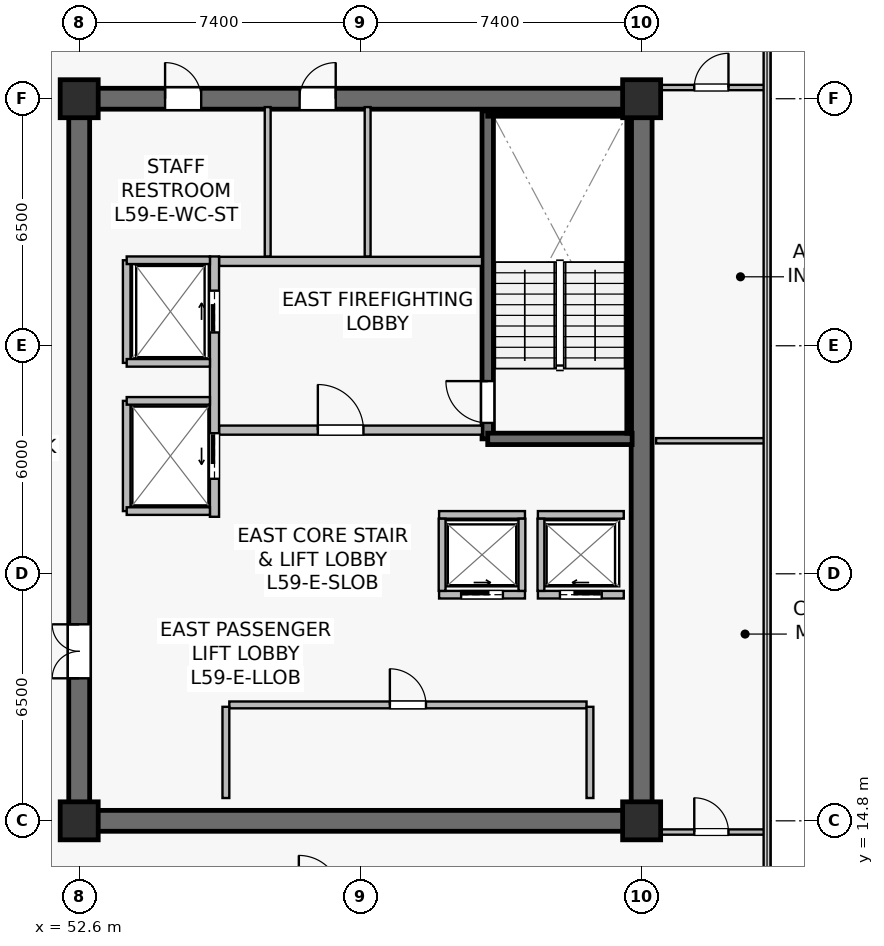
"""IFC4 building model, lengths in metres.
Left out: names, types, materials, properties, quantities, classifications, styles, units other than length and angle.
Written with IfcOpenShell. Run it as: python <this file> out.ifc"""

import sys

from ifc_helpers import new_model, si_unit, direction, frame, frame_2d, origin, origin_2d, place, context, subcontext, project, spatial, rectangle, extrude, source, transform, mapped, element, fill, save


model = new_model("IFC4")
c1 = context("Model", 3, precision=1e-05, world=origin(), true_north=direction((0.0, 1.0)))
c2 = subcontext(c1, "Body", "Model", "MODEL_VIEW")
j1 = project(units=[si_unit("LENGTHUNIT", "METRE"), si_unit("PLANEANGLEUNIT", "RADIAN")], contexts=[c1])
p1 = place(None, origin())
s1 = spatial("IfcSite", under=j1, at=p1, CompositionType="ELEMENT")
p2 = place(p1, origin())
s2 = spatial("IfcBuilding", under=s1, at=p2, CompositionType="ELEMENT")
p3 = place(p2, frame((0.0, 0.0, 246.5)))
s3 = spatial("IfcBuildingStorey", under=s2, at=p3, CompositionType="ELEMENT", Elevation=246.5)
p4 = place(p3, frame((52.325, 14.8, 0.0), z_axis=(0.0, 0.0, 1.0), x_axis=(1.0, 0.0, 0.0)))
e1 = element("IfcWall", 1, at=p4, inside=s3, PredefinedType="SHEAR", context=c2, shape_type="SweptSolid", body=[
    extrude(rectangle(XDim=15.35, YDim=0.55, at=frame_2d((7.675, 0.0))), origin(), (0.0, 0.0, 1.0), 3.8),
])
p5 = place(p3, frame((52.325, 33.8, 0.0), z_axis=(0.0, 0.0, 1.0), x_axis=(1.0, 0.0, 0.0)))
e2 = element("IfcWall", 2, at=p5, inside=s3, PredefinedType="SHEAR", context=c2, shape_type="SweptSolid", body=[
    extrude(rectangle(XDim=15.35, YDim=0.55, at=frame_2d((7.675, 0.0))), origin(), (0.0, 0.0, 1.0), 3.8),
])
p6 = place(p5, frame((6.075, 0.0, 0.0)))
e3 = element("IfcOpeningElement", 3, at=p6, cuts=e2, PredefinedType="OPENING", context=c2, shape_type="SweptSolid", body=[
    extrude(rectangle(XDim=0.95, YDim=2.15, at=frame_2d((0.475, 1.075))), frame((0.0, 0.285, 0.0), z_axis=(0.0, -1.0, 0.0), x_axis=(1.0, 0.0, 0.0)), (0.0, 0.0, 1.0), 0.57),
])
p7 = place(p5, frame((2.535, 0.0, 0.0)))
e4 = element("IfcOpeningElement", 4, at=p7, cuts=e2, PredefinedType="OPENING", context=c2, shape_type="SweptSolid", body=[
    extrude(rectangle(XDim=0.95, YDim=2.15, at=frame_2d((0.475, 1.075))), frame((0.0, 0.285, 0.0), z_axis=(0.0, -1.0, 0.0), x_axis=(1.0, 0.0, 0.0)), (0.0, 0.0, 1.0), 0.57),
])
p8 = place(p3, frame((52.6, 15.075, 0.0), z_axis=(0.0, 0.0, 1.0), x_axis=(0.0, 1.0, 0.0)))
e5 = element("IfcWall", 5, at=p8, inside=s3, PredefinedType="SHEAR", context=c2, shape_type="SweptSolid", body=[
    extrude(rectangle(XDim=18.45, YDim=0.55, at=frame_2d((9.225, 0.0))), origin(), (0.0, 0.0, 1.0), 3.8),
])
p9 = place(p8, frame((3.475, 0.0, 0.0)))
e6 = element("IfcOpeningElement", 6, at=p9, cuts=e5, PredefinedType="OPENING", context=c2, shape_type="SweptSolid", body=[
    extrude(rectangle(XDim=1.42, YDim=2.2, at=frame_2d((0.71, 1.1))), frame((0.0, 0.285, 0.0), z_axis=(0.0, -1.0, 0.0), x_axis=(1.0, 0.0, 0.0)), (0.0, 0.0, 1.0), 0.57),
])
p10 = place(p3, frame((67.4, 15.075, 0.0), z_axis=(0.0, 0.0, 1.0), x_axis=(0.0, 1.0, 0.0)))
e7 = element("IfcWall", 7, at=p10, inside=s3, PredefinedType="SHEAR", context=c2, shape_type="SweptSolid", body=[
    extrude(rectangle(XDim=18.45, YDim=0.55, at=frame_2d((9.225, 0.0))), origin(), (0.0, 0.0, 1.0), 3.8),
])
p11 = place(p3, frame((63.35, 24.85, 0.0), z_axis=(0.0, 0.0, 1.0), x_axis=(0.0, 1.0, 0.0)))
e8 = element("IfcWall", 8, at=p11, inside=s3, PredefinedType="SHEAR", context=c2, shape_type="SweptSolid", body=[
    extrude(rectangle(XDim=8.63, YDim=0.3, at=frame_2d((4.315, 0.0))), origin(), (0.0, 0.0, 1.0), 3.8),
])
p12 = place(p11, frame((0.42, 0.0, 0.0)))
e9 = element("IfcOpeningElement", 9, at=p12, cuts=e8, PredefinedType="OPENING", context=c2, shape_type="SweptSolid", body=[
    extrude(rectangle(XDim=1.1, YDim=2.15, at=frame_2d((0.55, 1.075))), frame((0.0, 0.16, 0.0), z_axis=(0.0, -1.0, 0.0), x_axis=(1.0, 0.0, 0.0)), (0.0, 0.0, 1.0), 0.32),
])
p13 = place(p3, frame((63.35, 24.85, 0.0), z_axis=(0.0, 0.0, 1.0), x_axis=(1.0, 0.0, 0.0)))
e10 = element("IfcWall", 10, at=p13, inside=s3, PredefinedType="SHEAR", context=c2, shape_type="SweptSolid", body=[
    extrude(rectangle(XDim=3.8, YDim=0.3, at=frame_2d((1.9, 0.0))), origin(), (0.0, 0.0, 1.0), 3.8),
])
p14 = place(p3, frame((63.35, 33.4, 0.0), z_axis=(0.0, 0.0, 1.0), x_axis=(1.0, 0.0, 0.0)))
e11 = element("IfcWall", 11, at=p14, inside=s3, PredefinedType="SOLIDWALL", context=c2, shape_type="SweptSolid", body=[
    extrude(rectangle(XDim=3.72, YDim=0.12, at=frame_2d((1.86, 0.0))), origin(), (0.0, 0.0, 1.0), 3.8),
])
p15 = place(p3, frame((67.07, 25.0, 0.0), z_axis=(0.0, 0.0, 1.0), x_axis=(0.0, 1.0, 0.0)))
e12 = element("IfcWall", 12, at=p15, inside=s3, PredefinedType="SOLIDWALL", context=c2, shape_type="SweptSolid", body=[
    extrude(rectangle(XDim=8.32, YDim=0.12, at=frame_2d((4.16, 0.0))), origin(), (0.0, 0.0, 1.0), 3.8),
])
m1 = source(origin(), c2, "Body", "SweptSolid", [
    extrude(rectangle(XDim=1.0, YDim=1.0, at=origin_2d()), origin(), (0.0, 0.0, 1.0), 4.1),
])
for number, where, z_axis, x_axis in (
    (13, (52.6, 14.8, 0.0), (0.0, 0.0, 1.0), (1.0, 0.0, 0.0)),
    (14, (67.4, 14.8, 0.0), (0.0, 0.0, 1.0), (1.0, 0.0, 0.0)),
    (15, (52.6, 33.8, 0.0), (0.0, 0.0, 1.0), (1.0, 0.0, 0.0)),
    (16, (67.4, 33.8, 0.0), (0.0, 0.0, 1.0), (1.0, 0.0, 0.0)),
):
    element("IfcColumn", number, at=place(p3, frame(where, z_axis=z_axis, x_axis=x_axis)), inside=s3, PredefinedType="COLUMN", context=c2, shape_type="MappedRepresentation", body=[
        mapped(m1, transform((0.0, 0.0, 0.0), scale=1.0)),
    ])
p16 = place(p3, frame((56.28, 25.08, 0.0), z_axis=(0.0, 0.0, 1.0), x_axis=(1.0, 0.0, 0.0)))
e17 = element("IfcWall", 17, at=p16, inside=s3, PredefinedType="SOLIDWALL", context=c2, shape_type="SweptSolid", body=[
    extrude(rectangle(XDim=6.92, YDim=0.24, at=frame_2d((3.46, 0.0))), origin(), (0.0, 0.0, 1.0), 3.197),
])
p17 = place(p16, frame((2.6, 0.0, 0.0)))
e18 = element("IfcOpeningElement", 18, at=p17, cuts=e17, PredefinedType="OPENING", context=c2, shape_type="SweptSolid", body=[
    extrude(rectangle(XDim=1.2, YDim=2.16, at=frame_2d((0.6, 1.08))), frame((0.0, 0.13, 0.0), z_axis=(0.0, -1.0, 0.0), x_axis=(1.0, 0.0, 0.0)), (0.0, 0.0, 1.0), 0.26),
])
p18 = place(p3, frame((56.28, 29.52, 0.0), z_axis=(0.0, 0.0, 1.0), x_axis=(1.0, 0.0, 0.0)))
e19 = element("IfcWall", 19, at=p18, inside=s3, PredefinedType="SOLIDWALL", context=c2, shape_type="SweptSolid", body=[
    extrude(rectangle(XDim=6.92, YDim=0.24, at=frame_2d((3.46, 0.0))), origin(), (0.0, 0.0, 1.0), 3.197),
])
p19 = place(p3, frame((56.16, 22.8, 0.0), z_axis=(0.0, 0.0, 1.0), x_axis=(0.0, 1.0, 0.0)))
e20 = element("IfcWall", 20, at=p19, inside=s3, PredefinedType="SOLIDWALL", context=c2, shape_type="SweptSolid", body=[
    extrude(rectangle(XDim=6.85, YDim=0.24, at=frame_2d((3.425, 0.0))), origin(), (0.0, 0.0, 1.0), 2.935),
])
p20 = place(p19, frame((4.85, 0.0, 0.0)))
e21 = element("IfcOpeningElement", 21, at=p20, cuts=e20, PredefinedType="OPENING", context=c2, shape_type="SweptSolid", body=[
    extrude(rectangle(XDim=1.1, YDim=2.22, at=frame_2d((0.55, 1.11))), frame((0.0, 0.13, 0.0), z_axis=(0.0, -1.0, 0.0), x_axis=(1.0, 0.0, 0.0)), (0.0, 0.0, 1.0), 0.26),
])
p21 = place(p19, frame((1.0, 0.0, 0.0)))
e22 = element("IfcOpeningElement", 22, at=p21, cuts=e20, PredefinedType="OPENING", context=c2, shape_type="SweptSolid", body=[
    extrude(rectangle(XDim=1.2, YDim=2.22, at=frame_2d((0.6, 1.11))), frame((0.0, 0.13, 0.0), z_axis=(0.0, -1.0, 0.0), x_axis=(1.0, 0.0, 0.0)), (0.0, 0.0, 1.0), 0.26),
])
p22 = place(p3, frame((64.67, 20.75, 0.0), z_axis=(0.0, 0.0, 1.0), x_axis=(1.0, 0.0, 0.0)))
e23 = element("IfcWall", 23, at=p22, inside=s3, PredefinedType="SOLIDWALL", context=c2, shape_type="SweptSolid", body=[
    extrude(rectangle(XDim=2.26, YDim=0.2, at=frame_2d((1.13, 0.0))), origin(), (0.0, 0.0, 1.0), 3.8),
])
p23 = place(p22, frame((0.58, 0.0, 0.0)))
e24 = element("IfcOpeningElement", 24, at=p23, cuts=e23, PredefinedType="OPENING", context=c2, shape_type="SweptSolid", body=[
    extrude(rectangle(XDim=1.1, YDim=2.22, at=frame_2d((0.55, 1.11))), frame((0.0, 0.11, 0.0), z_axis=(0.0, -1.0, 0.0), x_axis=(1.0, 0.0, 0.0)), (0.0, 0.0, 1.0), 0.22),
])
p24 = place(p3, frame((64.67, 22.85, 0.0), z_axis=(0.0, 0.0, 1.0), x_axis=(1.0, 0.0, 0.0)))
e25 = element("IfcWall", 25, at=p24, inside=s3, PredefinedType="SOLIDWALL", context=c2, shape_type="SweptSolid", body=[
    extrude(rectangle(XDim=2.26, YDim=0.2, at=frame_2d((1.13, 0.0))), origin(), (0.0, 0.0, 1.0), 3.8),
])
p25 = place(p3, frame((64.75, 20.85, 0.0), z_axis=(0.0, 0.0, 1.0), x_axis=(0.0, 1.0, 0.0)))
e26 = element("IfcWall", 26, at=p25, inside=s3, PredefinedType="SOLIDWALL", context=c2, shape_type="SweptSolid", body=[
    extrude(rectangle(XDim=1.9, YDim=0.18, at=frame_2d((0.95, 0.0))), origin(), (0.0, 0.0, 1.0), 3.8),
])
p26 = place(p3, frame((62.07, 20.75, 0.0), z_axis=(0.0, 0.0, 1.0), x_axis=(1.0, 0.0, 0.0)))
e27 = element("IfcWall", 27, at=p26, inside=s3, PredefinedType="SOLIDWALL", context=c2, shape_type="SweptSolid", body=[
    extrude(rectangle(XDim=2.26, YDim=0.2, at=frame_2d((1.13, 0.0))), origin(), (0.0, 0.0, 1.0), 3.8),
])
p27 = place(p26, frame((0.58, 0.0, 0.0)))
e28 = element("IfcOpeningElement", 28, at=p27, cuts=e27, PredefinedType="OPENING", context=c2, shape_type="SweptSolid", body=[
    extrude(rectangle(XDim=1.1, YDim=2.22, at=frame_2d((0.55, 1.11))), frame((0.0, 0.11, 0.0), z_axis=(0.0, -1.0, 0.0), x_axis=(1.0, 0.0, 0.0)), (0.0, 0.0, 1.0), 0.22),
])
p28 = place(p3, frame((62.07, 22.85, 0.0), z_axis=(0.0, 0.0, 1.0), x_axis=(1.0, 0.0, 0.0)))
e29 = element("IfcWall", 29, at=p28, inside=s3, PredefinedType="SOLIDWALL", context=c2, shape_type="SweptSolid", body=[
    extrude(rectangle(XDim=2.26, YDim=0.2, at=frame_2d((1.13, 0.0))), origin(), (0.0, 0.0, 1.0), 3.8),
])
for number, where, z_axis, x_axis in (
    (30, (62.15, 20.85, 0.0), (0.0, 0.0, 1.0), (0.0, 1.0, 0.0)),
    (31, (64.25, 20.85, 0.0), (0.0, 0.0, 1.0), (0.0, 1.0, 0.0)),
):
    element("IfcWall", number, at=place(p3, frame(where, z_axis=z_axis, x_axis=x_axis)), inside=s3, PredefinedType="SOLIDWALL", context=c2, shape_type="SweptSolid", body=[
        extrude(rectangle(XDim=1.9, YDim=0.18, at=frame_2d((0.95, 0.0))), origin(), (0.0, 0.0, 1.0), 3.8),
    ])
p29 = place(p3, frame((53.85, 26.85, 0.0), z_axis=(0.0, 0.0, 1.0), x_axis=(0.0, 1.0, 0.0)))
e32 = element("IfcWall", 32, at=p29, inside=s3, PredefinedType="SOLIDWALL", context=c2, shape_type="SweptSolid", body=[
    extrude(rectangle(XDim=2.7, YDim=0.2, at=frame_2d((1.35, 0.0))), origin(), (0.0, 0.0, 1.0), 3.8),
])
p30 = place(p3, frame((53.85, 29.55, 0.0), z_axis=(0.0, 0.0, 1.0), x_axis=(1.0, 0.0, 0.0)))
e33 = element("IfcWall", 33, at=p30, inside=s3, PredefinedType="SOLIDWALL", context=c2, shape_type="SweptSolid", body=[
    extrude(rectangle(XDim=2.19, YDim=0.2, at=frame_2d((1.095, 0.0))), origin(), (0.0, 0.0, 1.0), 3.8),
])
p31 = place(p3, frame((53.85, 26.85, 0.0), z_axis=(0.0, 0.0, 1.0), x_axis=(1.0, 0.0, 0.0)))
e34 = element("IfcWall", 34, at=p31, inside=s3, PredefinedType="SOLIDWALL", context=c2, shape_type="SweptSolid", body=[
    extrude(rectangle(XDim=2.19, YDim=0.2, at=frame_2d((1.095, 0.0))), origin(), (0.0, 0.0, 1.0), 3.197),
])
p32 = place(p3, frame((53.85, 22.95, 0.0), z_axis=(0.0, 0.0, 1.0), x_axis=(0.0, 1.0, 0.0)))
e35 = element("IfcWall", 35, at=p32, inside=s3, PredefinedType="SOLIDWALL", context=c2, shape_type="SweptSolid", body=[
    extrude(rectangle(XDim=2.9, YDim=0.2, at=frame_2d((1.45, 0.0))), origin(), (0.0, 0.0, 1.0), 2.935),
])
for number, where, z_axis, x_axis in (
    (36, (53.85, 25.85, 0.0), (0.0, 0.0, 1.0), (1.0, 0.0, 0.0)),
    (37, (53.85, 22.95, 0.0), (0.0, 0.0, 1.0), (1.0, 0.0, 0.0)),
):
    element("IfcWall", number, at=place(p3, frame(where, z_axis=z_axis, x_axis=x_axis)), inside=s3, PredefinedType="SOLIDWALL", context=c2, shape_type="SweptSolid", body=[
        extrude(rectangle(XDim=2.19, YDim=0.2, at=frame_2d((1.095, 0.0))), origin(), (0.0, 0.0, 1.0), 3.8),
    ])
p33 = place(p3, frame((56.55, 17.85, 0.0), z_axis=(0.0, 0.0, 1.0), x_axis=(1.0, 0.0, 0.0)))
e38 = element("IfcWall", 38, at=p33, inside=s3, PredefinedType="SOLIDWALL", context=c2, shape_type="SweptSolid", body=[
    extrude(rectangle(XDim=9.4, YDim=0.18, at=frame_2d((4.7, 0.0))), origin(), (0.0, 0.0, 1.0), 3.197),
])
p34 = place(p33, frame((4.225, 0.0, 0.0)))
e39 = element("IfcOpeningElement", 39, at=p34, cuts=e38, PredefinedType="OPENING", context=c2, shape_type="SweptSolid", body=[
    extrude(rectangle(XDim=0.95, YDim=2.15, at=frame_2d((0.475, 1.075))), frame((0.0, 0.1, 0.0), z_axis=(0.0, -1.0, 0.0), x_axis=(1.0, 0.0, 0.0)), (0.0, 0.0, 1.0), 0.2),
])
for number, where, z_axis, x_axis in (
    (40, (56.46, 15.4, 0.0), (0.0, 0.0, 1.0), (0.0, 1.0, 0.0)),
    (41, (66.04, 15.4, 0.0), (0.0, 0.0, 1.0), (0.0, 1.0, 0.0)),
):
    element("IfcWall", number, at=place(p3, frame(where, z_axis=z_axis, x_axis=x_axis)), inside=s3, PredefinedType="SOLIDWALL", context=c2, shape_type="SweptSolid", body=[
        extrude(rectangle(XDim=2.4, YDim=0.18, at=frame_2d((1.2, 0.0))), origin(), (0.0, 0.0, 1.0), 3.8),
    ])
p35 = place(p3, frame((60.19, 29.65, 0.0), z_axis=(0.0, 0.0, 1.0), x_axis=(0.0, 1.0, 0.0)))
e42 = element("IfcWall", 42, at=p35, inside=s3, PredefinedType="PLUMBINGWALL", context=c2, shape_type="SweptSolid", body=[
    extrude(rectangle(XDim=3.93, YDim=0.155, at=frame_2d((1.965, 0.0))), origin(), (0.0, 0.0, 1.0), 3.197),
])
p36 = place(p3, frame((57.56, 29.65, 0.0), z_axis=(0.0, 0.0, 1.0), x_axis=(0.0, 1.0, 0.0)))
e43 = element("IfcWall", 43, at=p36, inside=s3, PredefinedType="PLUMBINGWALL", context=c2, shape_type="SweptSolid", body=[
    extrude(rectangle(XDim=3.93, YDim=0.155, at=frame_2d((1.965, 0.0))), origin(), (0.0, 0.0, 1.0), 3.8),
])
p37 = place(p3, frame((67.78, 24.8, 0.0), z_axis=(0.0, 0.0, 1.0), x_axis=(1.0, 0.0, 0.0)))
e44 = element("IfcWall", 44, at=p37, inside=s3, PredefinedType="PARTITIONING", context=c2, shape_type="SweptSolid", body=[
    extrude(rectangle(XDim=2.91, YDim=0.14, at=frame_2d((1.455, 0.0))), origin(), (0.0, 0.0, 1.0), 3.8),
])
p38 = place(p3, frame((67.78, 14.505, 0.0), z_axis=(0.0, 0.0, 1.0), x_axis=(1.0, 0.0, 0.0)))
e45 = element("IfcWall", 45, at=p38, inside=s3, PredefinedType="PARTITIONING", context=c2, shape_type="SweptSolid", body=[
    extrude(rectangle(XDim=2.91, YDim=0.14, at=frame_2d((1.455, 0.0))), origin(), (0.0, 0.0, 1.0), 3.8),
])
p39 = place(p38, frame((1.005, 0.0, 0.0)))
e46 = element("IfcOpeningElement", 46, at=p39, cuts=e45, PredefinedType="OPENING", context=c2, shape_type="SweptSolid", body=[
    extrude(rectangle(XDim=0.9, YDim=2.1, at=frame_2d((0.45, 1.05))), frame((0.0, 0.08, 0.0), z_axis=(0.0, -1.0, 0.0), x_axis=(1.0, 0.0, 0.0)), (0.0, 0.0, 1.0), 0.16),
])
p40 = place(p3, frame((67.78, 34.095, 0.0), z_axis=(0.0, 0.0, 1.0), x_axis=(1.0, 0.0, 0.0)))
e47 = element("IfcWall", 47, at=p40, inside=s3, PredefinedType="PARTITIONING", context=c2, shape_type="SweptSolid", body=[
    extrude(rectangle(XDim=2.91, YDim=0.14, at=frame_2d((1.455, 0.0))), origin(), (0.0, 0.0, 1.0), 3.8),
])
p41 = place(p40, frame((1.005, 0.0, 0.0)))
e48 = element("IfcOpeningElement", 48, at=p41, cuts=e47, PredefinedType="OPENING", context=c2, shape_type="SweptSolid", body=[
    extrude(rectangle(XDim=0.9, YDim=2.1, at=frame_2d((0.45, 1.05))), frame((0.0, 0.08, 0.0), z_axis=(0.0, -1.0, 0.0), x_axis=(1.0, 0.0, 0.0)), (0.0, 0.0, 1.0), 0.16),
])
m2 = source(origin(), c2, "Body", "SweptSolid", [
    extrude(rectangle(XDim=1.1, YDim=2.15, at=frame_2d((0.55, 1.075))), frame((0.0, 0.025, 0.0), z_axis=(0.0, -1.0, 0.0), x_axis=(1.0, 0.0, 0.0)), (0.0, 0.0, 1.0), 0.05),
])
p42 = place(p12, origin())
e49 = element("IfcDoor", 49, at=p42, inside=s3, OperationType="SINGLE_SWING_RIGHT", PredefinedType="DOOR", context=c2, shape_type="MappedRepresentation", body=[
    mapped(m2, transform((0.0, 0.0, 0.0), scale=1.0)),
])
fill(e9, e49)
m3 = source(origin(), c2, "Body", "SweptSolid", [
    extrude(rectangle(XDim=1.2, YDim=2.16, at=frame_2d((0.6, 1.08))), frame((0.0, 0.025, 0.0), z_axis=(0.0, -1.0, 0.0), x_axis=(1.0, 0.0, 0.0)), (0.0, 0.0, 1.0), 0.05),
])
p43 = place(p17, origin())
e50 = element("IfcDoor", 50, at=p43, inside=s3, OperationType="SINGLE_SWING_LEFT", PredefinedType="DOOR", context=c2, shape_type="MappedRepresentation", body=[
    mapped(m3, transform((0.0, 0.0, 0.0), scale=1.0)),
])
fill(e18, e50)
m4 = source(origin(), c2, "Body", "SweptSolid", [
    extrude(rectangle(XDim=1.1, YDim=2.22, at=frame_2d((0.55, 1.11))), frame((0.0, 0.025, 0.0), z_axis=(0.0, -1.0, 0.0), x_axis=(1.0, 0.0, 0.0)), (0.0, 0.0, 1.0), 0.05),
])
p44 = place(p23, origin())
e51 = element("IfcDoor", 51, at=p44, inside=s3, OperationType="SLIDING_TO_LEFT", PredefinedType="USERDEFINED", context=c2, shape_type="MappedRepresentation", body=[
    mapped(m4, transform((0.0, 0.0, 0.0), scale=1.0)),
])
fill(e24, e51)
p45 = place(p27, origin())
e52 = element("IfcDoor", 52, at=p45, inside=s3, OperationType="SLIDING_TO_RIGHT", PredefinedType="USERDEFINED", context=c2, shape_type="MappedRepresentation", body=[
    mapped(m4, transform((0.0, 0.0, 0.0), scale=1.0)),
])
fill(e28, e52)
p46 = place(p20, origin())
e53 = element("IfcDoor", 53, at=p46, inside=s3, OperationType="SLIDING_TO_RIGHT", PredefinedType="USERDEFINED", context=c2, shape_type="MappedRepresentation", body=[
    mapped(m4, transform((0.0, 0.0, 0.0), scale=1.0)),
])
fill(e21, e53)
m5 = source(origin(), c2, "Body", "SweptSolid", [
    extrude(rectangle(XDim=1.2, YDim=2.22, at=frame_2d((0.6, 1.11))), frame((0.0, 0.025, 0.0), z_axis=(0.0, -1.0, 0.0), x_axis=(1.0, 0.0, 0.0)), (0.0, 0.0, 1.0), 0.05),
])
p47 = place(p21, origin())
e54 = element("IfcDoor", 54, at=p47, inside=s3, OperationType="SLIDING_TO_LEFT", PredefinedType="USERDEFINED", context=c2, shape_type="MappedRepresentation", body=[
    mapped(m5, transform((0.0, 0.0, 0.0), scale=1.0)),
])
fill(e22, e54)
m6 = source(origin(), c2, "Body", "SweptSolid", [
    extrude(rectangle(XDim=0.95, YDim=2.15, at=frame_2d((0.475, 1.075))), frame((0.0, 0.025, 0.0), z_axis=(0.0, -1.0, 0.0), x_axis=(1.0, 0.0, 0.0)), (0.0, 0.0, 1.0), 0.05),
])
p48 = place(p34, origin())
e55 = element("IfcDoor", 55, at=p48, inside=s3, OperationType="SINGLE_SWING_LEFT", PredefinedType="DOOR", context=c2, shape_type="MappedRepresentation", body=[
    mapped(m6, transform((0.0, 0.0, 0.0), scale=1.0)),
])
fill(e39, e55)
m7 = source(origin(), c2, "Body", "SweptSolid", [
    extrude(rectangle(XDim=1.42, YDim=2.2, at=frame_2d((0.71, 1.1))), frame((0.0, 0.025, 0.0), z_axis=(0.0, -1.0, 0.0), x_axis=(1.0, 0.0, 0.0)), (0.0, 0.0, 1.0), 0.05),
])
p49 = place(p9, origin())
e56 = element("IfcDoor", 56, at=p49, inside=s3, OperationType="DOUBLE_DOOR_SINGLE_SWING", PredefinedType="DOOR", context=c2, shape_type="MappedRepresentation", body=[
    mapped(m7, transform((0.0, 0.0, 0.0), scale=1.0)),
])
fill(e6, e56)
p50 = place(p6, origin())
e57 = element("IfcDoor", 57, at=p50, inside=s3, OperationType="SINGLE_SWING_RIGHT", PredefinedType="DOOR", context=c2, shape_type="MappedRepresentation", body=[
    mapped(m6, transform((0.0, 0.0, 0.0), scale=1.0)),
])
fill(e3, e57)
p51 = place(p7, origin())
e58 = element("IfcDoor", 58, at=p51, inside=s3, OperationType="SINGLE_SWING_LEFT", PredefinedType="DOOR", context=c2, shape_type="MappedRepresentation", body=[
    mapped(m6, transform((0.0, 0.0, 0.0), scale=1.0)),
])
fill(e4, e58)
m8 = source(origin(), c2, "Body", "SweptSolid", [
    extrude(rectangle(XDim=0.9, YDim=2.1, at=frame_2d((0.45, 1.05))), frame((0.0, 0.025, 0.0), z_axis=(0.0, -1.0, 0.0), x_axis=(1.0, 0.0, 0.0)), (0.0, 0.0, 1.0), 0.05),
])
p52 = place(p39, origin())
e59 = element("IfcDoor", 59, at=p52, inside=s3, OperationType="SINGLE_SWING_LEFT", PredefinedType="DOOR", context=c2, shape_type="MappedRepresentation", body=[
    mapped(m8, transform((0.0, 0.0, 0.0), scale=1.0)),
])
fill(e46, e59)
p53 = place(p41, origin())
e60 = element("IfcDoor", 60, at=p53, inside=s3, OperationType="SINGLE_SWING_RIGHT", PredefinedType="DOOR", context=c2, shape_type="MappedRepresentation", body=[
    mapped(m8, transform((0.0, 0.0, 0.0), scale=1.0)),
])
fill(e48, e60)
save(model, sys.argv[1])
